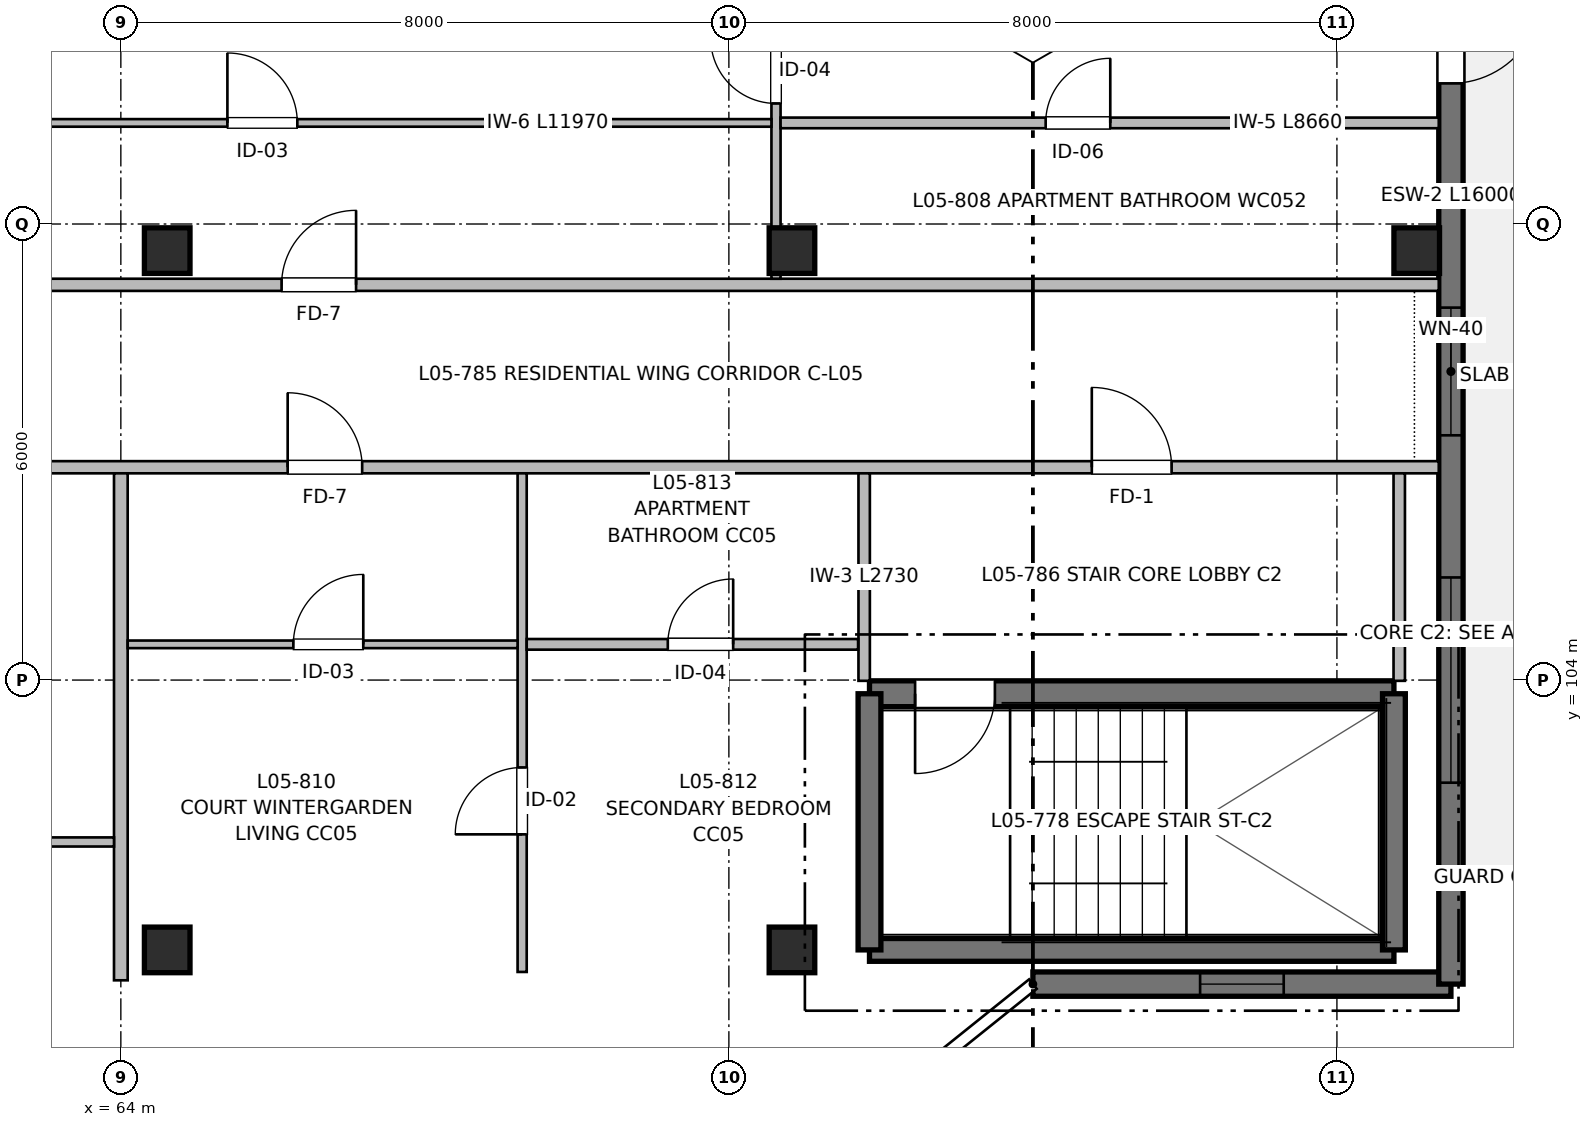
"""IFC4 building model, lengths in metres.
Left out: names, types, materials, properties, quantities, classifications, styles, units other than length and angle.
Written with IfcOpenShell. Run it as: python <this file> out.ifc"""

import sys

from ifc_helpers import new_model, si_unit, direction, frame, frame_2d, origin, origin_2d, place, context, subcontext, project, spatial, rectangle, extrude, element, fill, save


model = new_model("IFC4")
c1 = context("Model", 3, precision=1e-05, world=origin(), true_north=direction((0.0, 1.0)))
c2 = subcontext(c1, "Body", "Model", "MODEL_VIEW")
j1 = project(units=[si_unit("LENGTHUNIT", "METRE"), si_unit("PLANEANGLEUNIT", "RADIAN")], contexts=[c1])
p1 = place(None, origin())
s1 = spatial("IfcSite", under=j1, at=p1, CompositionType="ELEMENT")
p2 = place(p1, origin())
s2 = spatial("IfcBuilding", under=s1, at=p2, CompositionType="ELEMENT")
p3 = place(p2, frame((0.0, 0.0, 16.96)))
s3 = spatial("IfcBuildingStorey", under=s2, at=p3, CompositionType="ELEMENT", Elevation=16.96)
for number, where, z_axis, x_axis in (
    (1, (64.61, 100.45, 0.0), (0.0, 0.0, 1.0), (1.0, 0.0, 0.0)),
    (2, (64.61, 109.65, 0.0), (0.0, 0.0, 1.0), (1.0, 0.0, 0.0)),
    (3, (72.83, 100.45, 0.0), (0.0, 0.0, 1.0), (1.0, 0.0, 0.0)),
    (4, (72.83, 109.65, 0.0), (0.0, 0.0, 1.0), (1.0, 0.0, 0.0)),
    (5, (81.05, 109.65, 0.0), (0.0, 0.0, 1.0), (1.0, 0.0, 0.0)),
):
    element("IfcColumn", number, at=place(p3, frame(where, z_axis=z_axis, x_axis=x_axis)), inside=s3, PredefinedType="COLUMN", context=c2, shape_type="SweptSolid", body=[
        extrude(rectangle(XDim=0.6, YDim=0.6, at=origin_2d()), origin(), (0.0, 0.0, 1.0), 3.2),
    ])
p4 = place(p3, frame((73.85, 100.45, 0.0), z_axis=(0.0, 0.0, 1.0), x_axis=(1.0, 0.0, 0.0)))
e6 = element("IfcWall", 6, at=p4, inside=s3, PredefinedType="SHEAR", context=c2, shape_type="SweptSolid", body=[
    extrude(rectangle(XDim=6.9, YDim=0.3, at=frame_2d((3.45, 0.0))), origin(), (0.0, 0.0, 1.0), 3.2),
])
p5 = place(p3, frame((80.75, 103.82, 0.0), z_axis=(0.0, 0.0, 1.0), x_axis=(-1.0, 0.0, 0.0)))
e7 = element("IfcWall", 7, at=p5, inside=s3, PredefinedType="SHEAR", context=c2, shape_type="SweptSolid", body=[
    extrude(rectangle(XDim=6.9, YDim=0.34, at=frame_2d((3.45, 0.0))), origin(), (0.0, 0.0, 1.0), 3.2),
])
p6 = place(p5, frame((5.25, 0.0, 0.0)))
e8 = element("IfcOpeningElement", 8, at=p6, cuts=e7, PredefinedType="OPENING", context=c2, shape_type="SweptSolid", body=[
    extrude(rectangle(XDim=1.05, YDim=2.15, at=frame_2d((0.525, 1.075))), frame((0.0, 0.18, 0.0), z_axis=(0.0, -1.0, 0.0), x_axis=(1.0, 0.0, 0.0)), (0.0, 0.0, 1.0), 0.36),
])
for number, where, z_axis, x_axis in (
    (9, (73.85, 103.82, 0.0), (0.0, 0.0, 1.0), (0.0, -1.0, 0.0)),
    (10, (80.75, 100.45, 0.0), (0.0, 0.0, 1.0), (0.0, 1.0, 0.0)),
):
    element("IfcWall", number, at=place(p3, frame(where, z_axis=z_axis, x_axis=x_axis)), inside=s3, PredefinedType="SHEAR", context=c2, shape_type="SweptSolid", body=[
        extrude(rectangle(XDim=3.37, YDim=0.3, at=frame_2d((1.685, 0.0))), origin(), (0.0, 0.0, 1.0), 3.2),
    ])
p7 = place(p3, frame((81.5, 100.0, 0.0), z_axis=(0.0, 0.0, 1.0), x_axis=(-1.0, 0.0, 0.0)))
e11 = element("IfcWall", 11, at=p7, inside=s3, PredefinedType="SHEAR", context=c2, shape_type="SweptSolid", body=[
    extrude(rectangle(XDim=5.5, YDim=0.32, at=frame_2d((2.75, 0.0))), origin(), (0.0, 0.0, 1.0), 2.98),
])
p8 = place(p7, frame((2.2, 0.0, 0.62)))
e12 = element("IfcOpeningElement", 12, at=p8, cuts=e11, PredefinedType="OPENING", context=c2, shape_type="SweptSolid", body=[
    extrude(rectangle(XDim=1.1, YDim=1.6, at=frame_2d((0.55, 0.8))), frame((0.0, 0.17, 0.0), z_axis=(0.0, -1.0, 0.0), x_axis=(1.0, 0.0, 0.0)), (0.0, 0.0, 1.0), 0.34),
])
p9 = place(p3, frame((81.5, 116.0, 0.0), z_axis=(0.0, 0.0, 1.0), x_axis=(0.0, -1.0, 0.0)))
e13 = element("IfcWall", 13, at=p9, inside=s3, PredefinedType="SHEAR", context=c2, shape_type="SweptSolid", body=[
    extrude(rectangle(XDim=16.0, YDim=0.32, at=frame_2d((8.0, 0.0))), origin(), (0.0, 0.0, 1.0), 2.98),
])
p10 = place(p9, frame((2.95, 0.0, 0.0)))
e14 = element("IfcOpeningElement", 14, at=p10, cuts=e13, PredefinedType="OPENING", context=c2, shape_type="SweptSolid", body=[
    extrude(rectangle(XDim=1.2, YDim=2.2, at=frame_2d((0.6, 1.1))), frame((0.0, 0.17, 0.0), z_axis=(0.0, -1.0, 0.0), x_axis=(1.0, 0.0, 0.0)), (0.0, 0.0, 1.0), 0.34),
])
p11 = place(p9, frame((7.1, 0.0, 0.72)))
e15 = element("IfcOpeningElement", 15, at=p11, cuts=e13, PredefinedType="OPENING", context=c2, shape_type="SweptSolid", body=[
    extrude(rectangle(XDim=1.68, YDim=1.5, at=frame_2d((0.84, 0.75))), frame((0.0, 0.17, 0.0), z_axis=(0.0, -1.0, 0.0), x_axis=(1.0, 0.0, 0.0)), (0.0, 0.0, 1.0), 0.34),
])
p12 = place(p9, frame((10.65, 0.0, 0.47)))
e16 = element("IfcOpeningElement", 16, at=p12, cuts=e13, PredefinedType="OPENING", context=c2, shape_type="SweptSolid", body=[
    extrude(rectangle(XDim=2.7, YDim=1.75, at=frame_2d((1.35, 0.875))), frame((0.0, 0.17, 0.0), z_axis=(0.0, -1.0, 0.0), x_axis=(1.0, 0.0, 0.0)), (0.0, 0.0, 1.0), 0.34),
])
p13 = place(p3, frame((57.2, 106.8, 0.0), z_axis=(0.0, 0.0, 1.0), x_axis=(1.0, 0.0, 0.0)))
e17 = element("IfcWall", 17, at=p13, inside=s3, PredefinedType="PARTITIONING", context=c2, shape_type="SweptSolid", body=[
    extrude(rectangle(XDim=24.14, YDim=0.16, at=frame_2d((12.07, 0.0))), origin(), (0.0, 0.0, 1.0), 2.935),
])
p14 = place(p13, frame((19.575, 0.0, 0.0)))
e18 = element("IfcOpeningElement", 18, at=p14, cuts=e17, PredefinedType="OPENING", context=c2, shape_type="SweptSolid", body=[
    extrude(rectangle(XDim=1.05, YDim=2.15, at=frame_2d((0.525, 1.075))), frame((0.0, 0.09, 0.0), z_axis=(0.0, -1.0, 0.0), x_axis=(1.0, 0.0, 0.0)), (0.0, 0.0, 1.0), 0.18),
])
p15 = place(p13, frame((8.995, 0.0, 0.0)))
e19 = element("IfcOpeningElement", 19, at=p15, cuts=e17, PredefinedType="OPENING", context=c2, shape_type="SweptSolid", body=[
    extrude(rectangle(XDim=0.98, YDim=2.15, at=frame_2d((0.49, 1.075))), frame((0.0, 0.09, 0.0), z_axis=(0.0, -1.0, 0.0), x_axis=(1.0, 0.0, 0.0)), (0.0, 0.0, 1.0), 0.18),
])
p16 = place(p3, frame((39.66, 109.2, 0.0), z_axis=(0.0, 0.0, 1.0), x_axis=(1.0, 0.0, 0.0)))
e20 = element("IfcWall", 20, at=p16, inside=s3, PredefinedType="PARTITIONING", context=c2, shape_type="SweptSolid", body=[
    extrude(rectangle(XDim=41.68, YDim=0.16, at=frame_2d((20.84, 0.0))), origin(), (0.0, 0.0, 1.0), 2.935),
])
p17 = place(p16, frame((5.525, 0.0, 0.0)))
e21 = element("IfcOpeningElement", 21, at=p17, cuts=e20, PredefinedType="OPENING", context=c2, shape_type="SweptSolid", body=[
    extrude(rectangle(XDim=0.98, YDim=2.15, at=frame_2d((0.49, 1.075))), frame((0.0, 0.09, 0.0), z_axis=(0.0, -1.0, 0.0), x_axis=(1.0, 0.0, 0.0)), (0.0, 0.0, 1.0), 0.18),
])
p18 = place(p16, frame((26.455, 0.0, 0.0)))
e22 = element("IfcOpeningElement", 22, at=p18, cuts=e20, PredefinedType="OPENING", context=c2, shape_type="SweptSolid", body=[
    extrude(rectangle(XDim=0.98, YDim=2.15, at=frame_2d((0.49, 1.075))), frame((0.0, 0.09, 0.0), z_axis=(0.0, -1.0, 0.0), x_axis=(1.0, 0.0, 0.0)), (0.0, 0.0, 1.0), 0.18),
])
p19 = place(p3, frame((64.0, 100.05, 0.0), z_axis=(0.0, 0.0, 1.0), x_axis=(0.0, 1.0, 0.0)))
e23 = element("IfcWall", 23, at=p19, inside=s3, PredefinedType="PARTITIONING", context=c2, shape_type="SweptSolid", body=[
    extrude(rectangle(XDim=6.67, YDim=0.18, at=frame_2d((3.335, 0.0))), origin(), (0.0, 0.0, 1.0), 2.935),
])
for number, where, z_axis, x_axis in (
    (24, (73.78, 103.99, 0.0), (0.0, 0.0, 1.0), (0.0, 1.0, 0.0)),
    (25, (80.82, 103.99, 0.0), (0.0, 0.0, 1.0), (0.0, 1.0, 0.0)),
):
    element("IfcWall", number, at=place(p3, frame(where, z_axis=z_axis, x_axis=x_axis)), inside=s3, PredefinedType="PARTITIONING", context=c2, shape_type="SweptSolid", body=[
        extrude(rectangle(XDim=2.73, YDim=0.15, at=frame_2d((1.365, 0.0))), origin(), (0.0, 0.0, 1.0), 2.935),
    ])
p20 = place(p3, frame((59.72, 101.87, 0.0), z_axis=(0.0, 0.0, 1.0), x_axis=(1.0, 0.0, 0.0)))
e26 = element("IfcWall", 26, at=p20, inside=s3, PredefinedType="PARTITIONING", context=c2, shape_type="SweptSolid", body=[
    extrude(rectangle(XDim=4.19, YDim=0.12, at=frame_2d((2.095, 0.0))), origin(), (0.0, 0.0, 1.0), 2.935),
])
p21 = place(p20, frame((1.645, 0.0, 0.0)))
e27 = element("IfcOpeningElement", 27, at=p21, cuts=e26, PredefinedType="OPENING", context=c2, shape_type="SweptSolid", body=[
    extrude(rectangle(XDim=0.9, YDim=2.1, at=frame_2d((0.45, 1.05))), frame((0.0, 0.07, 0.0), z_axis=(0.0, -1.0, 0.0), x_axis=(1.0, 0.0, 0.0)), (0.0, 0.0, 1.0), 0.14),
])
p22 = place(p3, frame((72.62, 109.28, 0.0), z_axis=(0.0, 0.0, 1.0), x_axis=(0.0, 1.0, 0.0)))
e28 = element("IfcWall", 28, at=p22, inside=s3, PredefinedType="PARTITIONING", context=c2, shape_type="SweptSolid", body=[
    extrude(rectangle(XDim=6.59, YDim=0.12, at=frame_2d((3.295, 0.0))), origin(), (0.0, 0.0, 1.0), 2.935),
])
p23 = place(p22, frame((2.306, 0.0, 0.0)))
e29 = element("IfcOpeningElement", 29, at=p23, cuts=e28, PredefinedType="OPENING", context=c2, shape_type="SweptSolid", body=[
    extrude(rectangle(XDim=0.86, YDim=2.1, at=frame_2d((0.43, 1.05))), frame((0.0, 0.07, 0.0), z_axis=(0.0, -1.0, 0.0), x_axis=(1.0, 0.0, 0.0)), (0.0, 0.0, 1.0), 0.14),
])
p24 = place(p22, frame((4.093, 0.0, 0.0)))
e30 = element("IfcOpeningElement", 30, at=p24, cuts=e28, PredefinedType="OPENING", context=c2, shape_type="SweptSolid", body=[
    extrude(rectangle(XDim=0.9, YDim=2.1, at=frame_2d((0.45, 1.05))), frame((0.0, 0.07, 0.0), z_axis=(0.0, -1.0, 0.0), x_axis=(1.0, 0.0, 0.0)), (0.0, 0.0, 1.0), 0.14),
])
p25 = place(p3, frame((72.68, 111.33, 0.0), z_axis=(0.0, 0.0, 1.0), x_axis=(1.0, 0.0, 0.0)))
e31 = element("IfcWall", 31, at=p25, inside=s3, PredefinedType="PARTITIONING", context=c2, shape_type="SweptSolid", body=[
    extrude(rectangle(XDim=8.66, YDim=0.14, at=frame_2d((4.33, 0.0))), origin(), (0.0, 0.0, 1.0), 2.935),
])
p26 = place(p25, frame((3.488, 0.0, 0.0)))
e32 = element("IfcOpeningElement", 32, at=p26, cuts=e31, PredefinedType="OPENING", context=c2, shape_type="SweptSolid", body=[
    extrude(rectangle(XDim=0.85, YDim=2.05, at=frame_2d((0.425, 1.025))), frame((0.0, 0.08, 0.0), z_axis=(0.0, -1.0, 0.0), x_axis=(1.0, 0.0, 0.0)), (0.0, 0.0, 1.0), 0.16),
])
p27 = place(p3, frame((60.59, 111.33, 0.0), z_axis=(0.0, 0.0, 1.0), x_axis=(1.0, 0.0, 0.0)))
e33 = element("IfcWall", 33, at=p27, inside=s3, PredefinedType="PARTITIONING", context=c2, shape_type="SweptSolid", body=[
    extrude(rectangle(XDim=11.97, YDim=0.1, at=frame_2d((5.985, 0.0))), origin(), (0.0, 0.0, 1.0), 2.935),
])
p28 = place(p27, frame((4.812, 0.0, 0.0)))
e34 = element("IfcOpeningElement", 34, at=p28, cuts=e33, PredefinedType="OPENING", context=c2, shape_type="SweptSolid", body=[
    extrude(rectangle(XDim=0.92, YDim=2.1, at=frame_2d((0.46, 1.05))), frame((0.0, 0.06, 0.0), z_axis=(0.0, -1.0, 0.0), x_axis=(1.0, 0.0, 0.0)), (0.0, 0.0, 1.0), 0.12),
])
p29 = place(p3, frame((69.28, 100.16, 0.0), z_axis=(0.0, 0.0, 1.0), x_axis=(0.0, 1.0, 0.0)))
e35 = element("IfcWall", 35, at=p29, inside=s3, PredefinedType="PARTITIONING", context=c2, shape_type="SweptSolid", body=[
    extrude(rectangle(XDim=6.56, YDim=0.12, at=frame_2d((3.28, 0.0))), origin(), (0.0, 0.0, 1.0), 2.935),
])
p30 = place(p29, frame((1.81, 0.0, 0.0)))
e36 = element("IfcOpeningElement", 36, at=p30, cuts=e35, PredefinedType="OPENING", context=c2, shape_type="SweptSolid", body=[
    extrude(rectangle(XDim=0.88, YDim=2.1, at=frame_2d((0.44, 1.05))), frame((0.0, 0.07, 0.0), z_axis=(0.0, -1.0, 0.0), x_axis=(1.0, 0.0, 0.0)), (0.0, 0.0, 1.0), 0.14),
])
p31 = place(p3, frame((69.34, 104.47, 0.0), z_axis=(0.0, 0.0, 1.0), x_axis=(1.0, 0.0, 0.0)))
e37 = element("IfcWall", 37, at=p31, inside=s3, PredefinedType="PARTITIONING", context=c2, shape_type="SweptSolid", body=[
    extrude(rectangle(XDim=4.36, YDim=0.14, at=frame_2d((2.18, 0.0))), origin(), (0.0, 0.0, 1.0), 2.935),
])
p32 = place(p31, frame((1.856, 0.0, 0.0)))
e38 = element("IfcOpeningElement", 38, at=p32, cuts=e37, PredefinedType="OPENING", context=c2, shape_type="SweptSolid", body=[
    extrude(rectangle(XDim=0.86, YDim=2.1, at=frame_2d((0.43, 1.05))), frame((0.0, 0.08, 0.0), z_axis=(0.0, -1.0, 0.0), x_axis=(1.0, 0.0, 0.0)), (0.0, 0.0, 1.0), 0.16),
])
p33 = place(p3, frame((64.09, 104.47, 0.0), z_axis=(0.0, 0.0, 1.0), x_axis=(1.0, 0.0, 0.0)))
e39 = element("IfcWall", 39, at=p33, inside=s3, PredefinedType="PARTITIONING", context=c2, shape_type="SweptSolid", body=[
    extrude(rectangle(XDim=5.13, YDim=0.1, at=frame_2d((2.565, 0.0))), origin(), (0.0, 0.0, 1.0), 2.935),
])
p34 = place(p33, frame((2.18, 0.0, 0.0)))
e40 = element("IfcOpeningElement", 40, at=p34, cuts=e39, PredefinedType="OPENING", context=c2, shape_type="SweptSolid", body=[
    extrude(rectangle(XDim=0.92, YDim=2.1, at=frame_2d((0.46, 1.05))), frame((0.0, 0.06, 0.0), z_axis=(0.0, -1.0, 0.0), x_axis=(1.0, 0.0, 0.0)), (0.0, 0.0, 1.0), 0.12),
])
p35 = place(p6, origin())
e41 = element("IfcDoor", 41, at=p35, inside=s3, OperationType="SINGLE_SWING_RIGHT", PredefinedType="DOOR", context=c2, shape_type="SweptSolid", body=[
    extrude(rectangle(XDim=1.05, YDim=2.15, at=frame_2d((0.525, 1.075))), frame((0.0, 0.025, 0.0), z_axis=(0.0, -1.0, 0.0), x_axis=(1.0, 0.0, 0.0)), (0.0, 0.0, 1.0), 0.05),
])
fill(e8, e41)
p36 = place(p8, origin())
e42 = element("IfcWindow", 42, at=p36, inside=s3, PartitioningType="SINGLE_PANEL", PredefinedType="WINDOW", context=c2, shape_type="SweptSolid", body=[
    extrude(rectangle(XDim=1.1, YDim=1.6, at=frame_2d((0.55, 0.8))), frame((0.0, 0.03, 0.0), z_axis=(0.0, -1.0, 0.0), x_axis=(1.0, 0.0, 0.0)), (0.0, 0.0, 1.0), 0.06),
])
fill(e12, e42)
p37 = place(p10, origin())
e43 = element("IfcDoor", 43, at=p37, inside=s3, OperationType="SINGLE_SWING_LEFT", PredefinedType="DOOR", context=c2, shape_type="SweptSolid", body=[
    extrude(rectangle(XDim=1.2, YDim=2.2, at=frame_2d((0.6, 1.1))), frame((0.0, 0.025, 0.0), z_axis=(0.0, -1.0, 0.0), x_axis=(1.0, 0.0, 0.0)), (0.0, 0.0, 1.0), 0.05),
])
fill(e14, e43)
p38 = place(p11, origin())
e44 = element("IfcWindow", 44, at=p38, inside=s3, PartitioningType="SINGLE_PANEL", PredefinedType="WINDOW", context=c2, shape_type="SweptSolid", body=[
    extrude(rectangle(XDim=1.68, YDim=1.5, at=frame_2d((0.84, 0.75))), frame((0.0, 0.03, 0.0), z_axis=(0.0, -1.0, 0.0), x_axis=(1.0, 0.0, 0.0)), (0.0, 0.0, 1.0), 0.06),
])
fill(e15, e44)
p39 = place(p12, origin())
e45 = element("IfcWindow", 45, at=p39, inside=s3, PartitioningType="SINGLE_PANEL", PredefinedType="WINDOW", context=c2, shape_type="SweptSolid", body=[
    extrude(rectangle(XDim=2.7, YDim=1.75, at=frame_2d((1.35, 0.875))), frame((0.0, 0.03, 0.0), z_axis=(0.0, -1.0, 0.0), x_axis=(1.0, 0.0, 0.0)), (0.0, 0.0, 1.0), 0.06),
])
fill(e16, e45)
p40 = place(p14, origin())
e46 = element("IfcDoor", 46, at=p40, inside=s3, OperationType="SINGLE_SWING_LEFT", PredefinedType="DOOR", context=c2, shape_type="SweptSolid", body=[
    extrude(rectangle(XDim=1.05, YDim=2.15, at=frame_2d((0.525, 1.075))), frame((0.0, 0.025, 0.0), z_axis=(0.0, -1.0, 0.0), x_axis=(1.0, 0.0, 0.0)), (0.0, 0.0, 1.0), 0.05),
])
fill(e18, e46)
p41 = place(p18, origin())
e47 = element("IfcDoor", 47, at=p41, inside=s3, OperationType="SINGLE_SWING_RIGHT", PredefinedType="DOOR", context=c2, shape_type="SweptSolid", body=[
    extrude(rectangle(XDim=0.98, YDim=2.15, at=frame_2d((0.49, 1.075))), frame((0.0, 0.025, 0.0), z_axis=(0.0, -1.0, 0.0), x_axis=(1.0, 0.0, 0.0)), (0.0, 0.0, 1.0), 0.05),
])
fill(e22, e47)
p42 = place(p28, origin())
e48 = element("IfcDoor", 48, at=p42, inside=s3, OperationType="SINGLE_SWING_LEFT", PredefinedType="DOOR", context=c2, shape_type="SweptSolid", body=[
    extrude(rectangle(XDim=0.92, YDim=2.1, at=frame_2d((0.46, 1.05))), frame((0.0, 0.025, 0.0), z_axis=(0.0, -1.0, 0.0), x_axis=(1.0, 0.0, 0.0)), (0.0, 0.0, 1.0), 0.05),
])
fill(e34, e48)
p43 = place(p23, origin())
e49 = element("IfcDoor", 49, at=p43, inside=s3, OperationType="SINGLE_SWING_RIGHT", PredefinedType="DOOR", context=c2, shape_type="SweptSolid", body=[
    extrude(rectangle(XDim=0.86, YDim=2.1, at=frame_2d((0.43, 1.05))), frame((0.0, 0.025, 0.0), z_axis=(0.0, -1.0, 0.0), x_axis=(1.0, 0.0, 0.0)), (0.0, 0.0, 1.0), 0.05),
])
fill(e29, e49)
p44 = place(p26, origin())
e50 = element("IfcDoor", 50, at=p44, inside=s3, OperationType="SINGLE_SWING_RIGHT", PredefinedType="DOOR", context=c2, shape_type="SweptSolid", body=[
    extrude(rectangle(XDim=0.85, YDim=2.05, at=frame_2d((0.425, 1.025))), frame((0.0, 0.025, 0.0), z_axis=(0.0, -1.0, 0.0), x_axis=(1.0, 0.0, 0.0)), (0.0, 0.0, 1.0), 0.05),
])
fill(e32, e50)
p45 = place(p15, origin())
e51 = element("IfcDoor", 51, at=p45, inside=s3, OperationType="SINGLE_SWING_LEFT", PredefinedType="DOOR", context=c2, shape_type="SweptSolid", body=[
    extrude(rectangle(XDim=0.98, YDim=2.15, at=frame_2d((0.49, 1.075))), frame((0.0, 0.025, 0.0), z_axis=(0.0, -1.0, 0.0), x_axis=(1.0, 0.0, 0.0)), (0.0, 0.0, 1.0), 0.05),
])
fill(e19, e51)
p46 = place(p34, origin())
e52 = element("IfcDoor", 52, at=p46, inside=s3, OperationType="SINGLE_SWING_RIGHT", PredefinedType="DOOR", context=c2, shape_type="SweptSolid", body=[
    extrude(rectangle(XDim=0.92, YDim=2.1, at=frame_2d((0.46, 1.05))), frame((0.0, 0.025, 0.0), z_axis=(0.0, -1.0, 0.0), x_axis=(1.0, 0.0, 0.0)), (0.0, 0.0, 1.0), 0.05),
])
fill(e40, e52)
p47 = place(p30, origin())
e53 = element("IfcDoor", 53, at=p47, inside=s3, OperationType="SINGLE_SWING_LEFT", PredefinedType="DOOR", context=c2, shape_type="SweptSolid", body=[
    extrude(rectangle(XDim=0.88, YDim=2.1, at=frame_2d((0.44, 1.05))), frame((0.0, 0.025, 0.0), z_axis=(0.0, -1.0, 0.0), x_axis=(1.0, 0.0, 0.0)), (0.0, 0.0, 1.0), 0.05),
])
fill(e36, e53)
p48 = place(p32, origin())
e54 = element("IfcDoor", 54, at=p48, inside=s3, OperationType="SINGLE_SWING_RIGHT", PredefinedType="DOOR", context=c2, shape_type="SweptSolid", body=[
    extrude(rectangle(XDim=0.86, YDim=2.1, at=frame_2d((0.43, 1.05))), frame((0.0, 0.025, 0.0), z_axis=(0.0, -1.0, 0.0), x_axis=(1.0, 0.0, 0.0)), (0.0, 0.0, 1.0), 0.05),
])
fill(e38, e54)
save(model, sys.argv[1])
